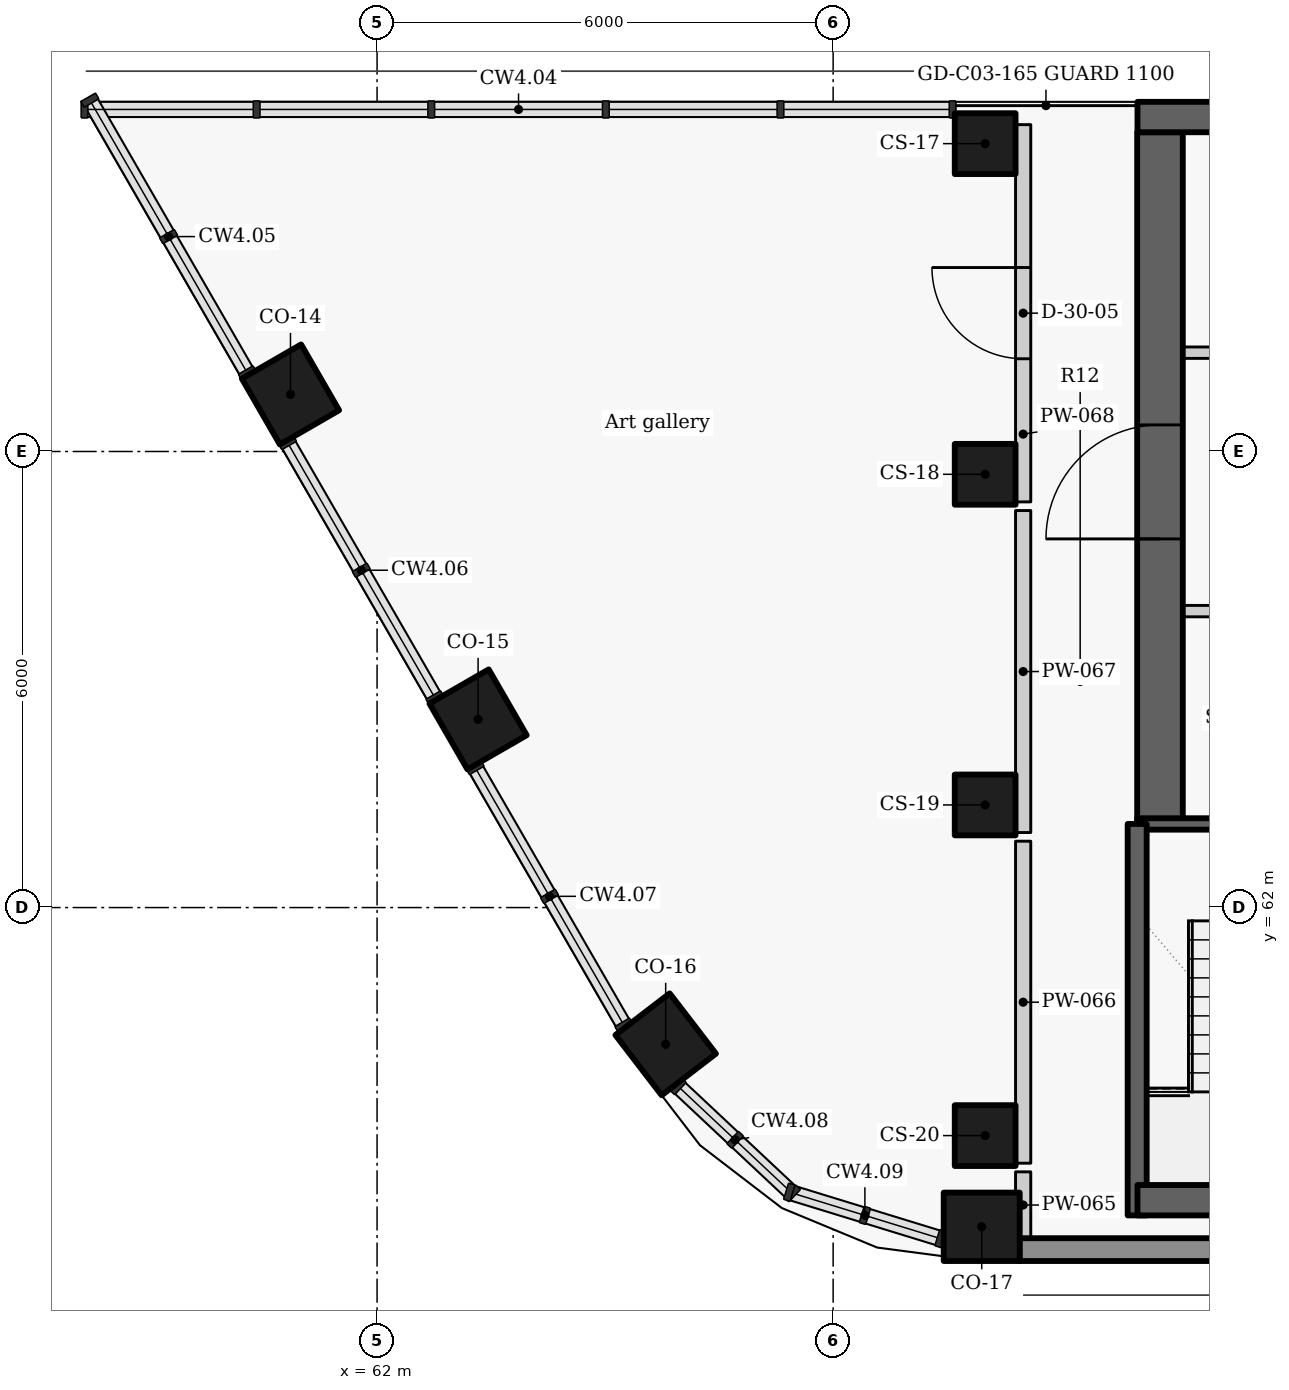
"""IFC4 building model, lengths in metres.
Left out: names, types, materials, properties, quantities, classifications, styles, units other than length and angle.
Written with IfcOpenShell. Run it as: python <this file> out.ifc"""

import sys

from ifc_helpers import new_model, si_unit, direction, frame, frame_2d, origin, origin_2d, place, context, subcontext, project, spatial, rectangle, extrude, element, fill, save


model = new_model("IFC4")
c1 = context("Model", 3, precision=1e-05, world=origin(), true_north=direction((0.0, 1.0)))
c2 = subcontext(c1, "Body", "Model", "MODEL_VIEW")
j1 = project(units=[si_unit("LENGTHUNIT", "METRE"), si_unit("PLANEANGLEUNIT", "RADIAN")], contexts=[c1])
p1 = place(None, origin())
s1 = spatial("IfcSite", under=j1, at=p1, CompositionType="ELEMENT")
p2 = place(p1, origin())
s2 = spatial("IfcBuilding", under=s1, at=p2, CompositionType="ELEMENT")
p3 = place(p2, frame((0.0, 0.0, 279.6)))
s3 = spatial("IfcBuildingStorey", under=s2, at=p3, CompositionType="ELEMENT", Elevation=279.6)
for number, where, z_axis, x_axis in (
    (1, (60.861, 68.75, 0.0), (0.0, 0.0, 1.0), (0.5, -0.866, 0.0)),
    (2, (63.329, 64.475, 0.0), (0.0, 0.0, 1.0), (0.5, -0.866, 0.0)),
    (3, (65.797, 60.2, 0.0), (0.0, 0.0, 1.0), (0.609, -0.793, 0.0)),
    (4, (69.955, 57.8, 0.0), (0.0, 0.0, 1.0), (1.0, 0.0, 0.0)),
):
    element("IfcColumn", number, at=place(p3, frame(where, z_axis=z_axis, x_axis=x_axis)), inside=s3, PredefinedType="COLUMN", context=c2, shape_type="SweptSolid", body=[
        extrude(rectangle(XDim=1.0, YDim=0.9, at=origin_2d()), origin(), (0.0, 0.0, 1.0), 3.6),
    ])
for number, where, z_axis, x_axis in (
    (5, (70.0, 72.05, 0.0), (0.0, 0.0, 1.0), (0.0, -1.0, 0.0)),
    (6, (70.0, 67.7, 0.0), (0.0, 0.0, 1.0), (0.0, -1.0, 0.0)),
    (7, (70.0, 63.35, 0.0), (0.0, 0.0, 1.0), (0.0, -1.0, 0.0)),
    (8, (70.0, 59.0, 0.0), (0.0, 0.0, 1.0), (0.0, -1.0, 0.0)),
):
    element("IfcColumn", number, at=place(p3, frame(where, z_axis=z_axis, x_axis=x_axis)), inside=s3, PredefinedType="COLUMN", context=c2, shape_type="SweptSolid", body=[
        extrude(rectangle(XDim=0.8, YDim=0.8, at=origin_2d()), origin(), (0.0, 0.0, 1.0), 3.6),
    ])
p4 = place(p3, frame((70.451, 57.5, 0.0), z_axis=(0.0, 0.0, 1.0), x_axis=(1.0, 0.0, 0.0)))
e9 = element("IfcWall", 9, at=p4, inside=s3, PredefinedType="SOLIDWALL", context=c2, shape_type="SweptSolid", body=[
    extrude(rectangle(XDim=19.093, YDim=0.3, at=frame_2d((9.546, 0.0))), origin(), (0.0, 0.0, 1.0), 2.725),
])
p5 = place(p3, frame((72.0, 69.3, 0.0), z_axis=(0.0, 0.0, 1.0), x_axis=(1.0, 0.0, 0.0)))
e10 = element("IfcWall", 10, at=p5, inside=s3, PredefinedType="PARTITIONING", context=c2, shape_type="SweptSolid", body=[
    extrude(rectangle(XDim=13.4, YDim=0.15, at=frame_2d((6.7, 0.0))), origin(), (0.0, 0.0, 1.0), 3.325),
])
p6 = place(p5, frame((1.175, 0.0, 0.0)))
e11 = element("IfcOpeningElement", 11, at=p6, cuts=e10, PredefinedType="OPENING", context=c2, shape_type="SweptSolid", body=[
    extrude(rectangle(XDim=0.9, YDim=2.1, at=frame_2d((0.45, 1.05))), frame((0.0, 0.085, 0.0), z_axis=(0.0, -1.0, 0.0), x_axis=(1.0, 0.0, 0.0)), (0.0, 0.0, 1.0), 0.17),
])
p7 = place(p5, frame((4.85, 0.0, 0.0)))
e12 = element("IfcOpeningElement", 12, at=p7, cuts=e10, PredefinedType="OPENING", context=c2, shape_type="SweptSolid", body=[
    extrude(rectangle(XDim=0.9, YDim=2.1, at=frame_2d((0.45, 1.05))), frame((0.0, 0.085, 0.0), z_axis=(0.0, -1.0, 0.0), x_axis=(1.0, 0.0, 0.0)), (0.0, 0.0, 1.0), 0.17),
])
p8 = place(p5, frame((8.9, 0.0, 0.0)))
e13 = element("IfcOpeningElement", 13, at=p8, cuts=e10, PredefinedType="OPENING", context=c2, shape_type="SweptSolid", body=[
    extrude(rectangle(XDim=0.9, YDim=2.1, at=frame_2d((0.45, 1.05))), frame((0.0, 0.085, 0.0), z_axis=(0.0, -1.0, 0.0), x_axis=(1.0, 0.0, 0.0)), (0.0, 0.0, 1.0), 0.17),
])
p9 = place(p5, frame((11.6, 0.0, 0.0)))
e14 = element("IfcOpeningElement", 14, at=p9, cuts=e10, PredefinedType="OPENING", context=c2, shape_type="SweptSolid", body=[
    extrude(rectangle(XDim=0.9, YDim=2.1, at=frame_2d((0.45, 1.05))), frame((0.0, 0.085, 0.0), z_axis=(0.0, -1.0, 0.0), x_axis=(1.0, 0.0, 0.0)), (0.0, 0.0, 1.0), 0.17),
])
p10 = place(p3, frame((72.3, 63.1, -0.275), z_axis=(0.0, 0.0, 1.0), x_axis=(0.0, 1.0, 0.0)))
e15 = element("IfcWall", 15, at=p10, inside=s3, PredefinedType="SHEAR", context=c2, shape_type="SweptSolid", body=[
    extrude(rectangle(XDim=9.1, YDim=0.6, at=frame_2d((4.55, 0.0))), origin(), (0.0, 0.0, 1.0), 3.6),
])
p11 = place(p10, frame((3.75, 0.0, 0.275)))
e16 = element("IfcOpeningElement", 16, at=p11, cuts=e15, PredefinedType="OPENING", context=c2, shape_type="SweptSolid", body=[
    extrude(rectangle(XDim=1.5, YDim=2.1, at=frame_2d((0.75, 1.05))), frame((0.0, 0.31, 0.0), z_axis=(0.0, -1.0, 0.0), x_axis=(1.0, 0.0, 0.0)), (0.0, 0.0, 1.0), 0.62),
])
p12 = place(p3, frame((82.703, 65.9, 0.0), z_axis=(0.0, 0.0, 1.0), x_axis=(-1.0, 0.0, 0.0)))
e17 = element("IfcWall", 17, at=p12, inside=s3, PredefinedType="PARTITIONING", context=c2, shape_type="SweptSolid", body=[
    extrude(rectangle(XDim=10.703, YDim=0.15, at=frame_2d((5.352, 0.0))), origin(), (0.0, 0.0, 1.0), 3.325),
])
p13 = place(p12, frame((8.528, 0.0, 0.0)))
e18 = element("IfcOpeningElement", 18, at=p13, cuts=e17, PredefinedType="OPENING", context=c2, shape_type="SweptSolid", body=[
    extrude(rectangle(XDim=1.1, YDim=2.1, at=frame_2d((0.55, 1.05))), frame((0.0, 0.085, 0.0), z_axis=(0.0, -1.0, 0.0), x_axis=(1.0, 0.0, 0.0)), (0.0, 0.0, 1.0), 0.17),
])
p14 = place(p12, frame((6.303, 0.0, 0.0)))
e19 = element("IfcOpeningElement", 19, at=p14, cuts=e17, PredefinedType="OPENING", context=c2, shape_type="SweptSolid", body=[
    extrude(rectangle(XDim=0.9, YDim=2.1, at=frame_2d((0.45, 1.05))), frame((0.0, 0.085, 0.0), z_axis=(0.0, -1.0, 0.0), x_axis=(1.0, 0.0, 0.0)), (0.0, 0.0, 1.0), 0.17),
])
p15 = place(p12, frame((3.453, 0.0, 0.0)))
e20 = element("IfcOpeningElement", 20, at=p15, cuts=e17, PredefinedType="OPENING", context=c2, shape_type="SweptSolid", body=[
    extrude(rectangle(XDim=1.2, YDim=2.1, at=frame_2d((0.6, 1.05))), frame((0.0, 0.085, 0.0), z_axis=(0.0, -1.0, 0.0), x_axis=(1.0, 0.0, 0.0)), (0.0, 0.0, 1.0), 0.17),
])
p16 = place(p12, frame((0.903, 0.0, 0.0)))
e21 = element("IfcOpeningElement", 21, at=p16, cuts=e17, PredefinedType="OPENING", context=c2, shape_type="SweptSolid", body=[
    extrude(rectangle(XDim=0.9, YDim=2.1, at=frame_2d((0.45, 1.05))), frame((0.0, 0.085, 0.0), z_axis=(0.0, -1.0, 0.0), x_axis=(1.0, 0.0, 0.0)), (0.0, 0.0, 1.0), 0.17),
])
p17 = place(p3, frame((72.0, 63.1, -0.275), z_axis=(0.0, 0.0, 1.0), x_axis=(1.0, 0.0, 0.0)))
e22 = element("IfcWall", 22, at=p17, inside=s3, PredefinedType="SHEAR", context=c2, shape_type="SweptSolid", body=[
    extrude(rectangle(XDim=2.6, YDim=0.15, at=frame_2d((1.3, 0.0))), origin(), (0.0, 0.0, 1.0), 3.6),
])
p18 = place(p17, frame((1.02, 0.0, 0.275)))
e23 = element("IfcOpeningElement", 23, at=p18, cuts=e22, PredefinedType="OPENING", context=c2, shape_type="SweptSolid", body=[
    extrude(rectangle(XDim=1.1, YDim=2.1, at=frame_2d((0.55, 1.05))), frame((0.0, 0.085, 0.0), z_axis=(0.0, -1.0, 0.0), x_axis=(1.0, 0.0, 0.0)), (0.0, 0.0, 1.0), 0.17),
])
p19 = place(p3, frame((72.0, 57.95, -0.275), z_axis=(0.0, 0.0, 1.0), x_axis=(0.0, 1.0, 0.0)))
e24 = element("IfcWall", 24, at=p19, inside=s3, PredefinedType="SHEAR", context=c2, shape_type="SweptSolid", body=[
    extrude(rectangle(XDim=5.15, YDim=0.25, at=frame_2d((2.575, 0.0))), origin(), (0.0, 0.0, 1.0), 3.6),
])
p20 = place(p3, frame((70.5, 57.65, 0.0), z_axis=(0.0, 0.0, 1.0), x_axis=(0.0, 1.0, 0.0)))
e25 = element("IfcWall", 25, at=p20, inside=s3, PredefinedType="PARTITIONING", context=c2, shape_type="SweptSolid", body=[
    extrude(rectangle(XDim=0.873, YDim=0.2, at=frame_2d((0.437, 0.0))), origin(), (0.0, 0.0, 1.0), 3.325),
])
p21 = place(p3, frame((70.5, 58.637, 0.0), z_axis=(0.0, 0.0, 1.0), x_axis=(0.0, 1.0, 0.0)))
e26 = element("IfcWall", 26, at=p21, inside=s3, PredefinedType="PARTITIONING", context=c2, shape_type="SweptSolid", body=[
    extrude(rectangle(XDim=4.236, YDim=0.2, at=frame_2d((2.118, 0.0))), origin(), (0.0, 0.0, 1.0), 3.325),
])
p22 = place(p3, frame((70.5, 62.987, 0.0), z_axis=(0.0, 0.0, 1.0), x_axis=(0.0, 1.0, 0.0)))
e27 = element("IfcWall", 27, at=p22, inside=s3, PredefinedType="PARTITIONING", context=c2, shape_type="SweptSolid", body=[
    extrude(rectangle(XDim=4.236, YDim=0.2, at=frame_2d((2.118, 0.0))), origin(), (0.0, 0.0, 1.0), 3.325),
])
p23 = place(p3, frame((70.5, 67.337, 0.0), z_axis=(0.0, 0.0, 1.0), x_axis=(0.0, 1.0, 0.0)))
e28 = element("IfcWall", 28, at=p23, inside=s3, PredefinedType="PARTITIONING", context=c2, shape_type="SweptSolid", body=[
    extrude(rectangle(XDim=4.963, YDim=0.2, at=frame_2d((2.481, 0.0))), origin(), (0.0, 0.0, 1.0), 3.325),
])
p24 = place(p23, frame((1.883, 0.0, 0.0)))
e29 = element("IfcOpeningElement", 29, at=p24, cuts=e28, PredefinedType="OPENING", context=c2, shape_type="SweptSolid", body=[
    extrude(rectangle(XDim=1.2, YDim=2.1, at=frame_2d((0.6, 1.05))), frame((0.0, 0.11, 0.0), z_axis=(0.0, -1.0, 0.0), x_axis=(1.0, 0.0, 0.0)), (0.0, 0.0, 1.0), 0.22),
])
p25 = place(p3, frame((72.004, 72.4, -0.275), z_axis=(0.0, 0.0, 1.0), x_axis=(1.0, 0.0, 0.0)))
e30 = element("IfcWall", 30, at=p25, inside=s3, PredefinedType="SHEAR", context=c2, shape_type="SweptSolid", body=[
    extrude(rectangle(XDim=13.396, YDim=0.4, at=frame_2d((6.698, 0.0))), origin(), (0.0, 0.0, 1.0), 3.6),
])
p26 = place(p3, frame((72.004, 58.15, -0.275), z_axis=(0.0, 0.0, 1.0), x_axis=(1.0, 0.0, 0.0)))
e31 = element("IfcWall", 31, at=p26, inside=s3, PredefinedType="SHEAR", context=c2, shape_type="SweptSolid", body=[
    extrude(rectangle(XDim=15.992, YDim=0.4, at=frame_2d((7.996, 0.0))), origin(), (0.0, 0.0, 1.0), 3.6),
])
p27 = place(p24, origin())
e32 = element("IfcDoor", 32, at=p27, inside=s3, OperationType="SINGLE_SWING_RIGHT", PredefinedType="DOOR", context=c2, shape_type="SweptSolid", body=[
    extrude(rectangle(XDim=1.2, YDim=2.1, at=frame_2d((0.6, 1.05))), frame((0.0, 0.025, 0.0), z_axis=(0.0, -1.0, 0.0), x_axis=(1.0, 0.0, 0.0)), (0.0, 0.0, 1.0), 0.05),
])
fill(e29, e32)
p28 = place(p11, origin())
e33 = element("IfcDoor", 33, at=p28, inside=s3, OperationType="DOUBLE_DOOR_SINGLE_SWING", PredefinedType="DOOR", context=c2, shape_type="SweptSolid", body=[
    extrude(rectangle(XDim=1.5, YDim=2.1, at=frame_2d((0.75, 1.05))), frame((0.0, 0.025, 0.0), z_axis=(0.0, -1.0, 0.0), x_axis=(1.0, 0.0, 0.0)), (0.0, 0.0, 1.0), 0.05),
])
fill(e16, e33)
save(model, sys.argv[1])
